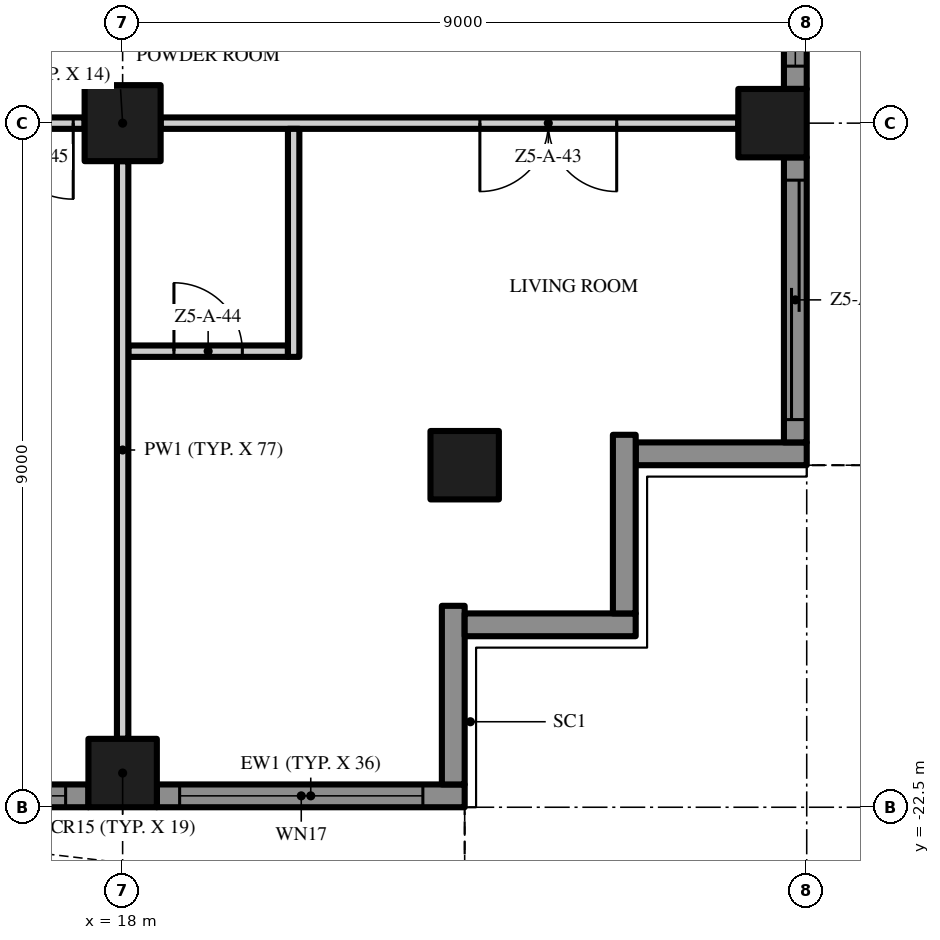
"""IFC4 building model, lengths in metres.
Left out: names, types, materials, properties, quantities, classifications, styles, units other than length and angle.
Written with IfcOpenShell. Run it as: python <this file> out.ifc"""

import sys

from ifc_helpers import new_model, si_unit, direction, frame, frame_2d, origin, origin_2d, place, context, subcontext, project, spatial, polyline, rectangle, outline, extrude, element, fill, save


model = new_model("IFC4")
c1 = context("Model", 3, precision=1e-05, world=origin(), true_north=direction((0.0, 1.0)))
c2 = subcontext(c1, "Body", "Model", "MODEL_VIEW")
j1 = project(units=[si_unit("LENGTHUNIT", "METRE"), si_unit("PLANEANGLEUNIT", "RADIAN")], contexts=[c1])
p1 = place(None, origin())
s1 = spatial("IfcSite", under=j1, at=p1, CompositionType="ELEMENT")
p2 = place(p1, origin())
s2 = spatial("IfcBuilding", under=s1, at=p2, CompositionType="ELEMENT")
p3 = place(p2, frame((0.0, 0.0, 246.4)))
s3 = spatial("IfcBuildingStorey", under=s2, at=p3, CompositionType="ELEMENT", Elevation=246.4)
p4 = place(p3, frame((18.0, -13.5, 0.0), z_axis=(0.0, 0.0, 1.0), x_axis=(1.0, 0.0, 0.0)))
e1 = element("IfcColumn", 1, at=p4, inside=s3, PredefinedType="COLUMN", context=c2, shape_type="SweptSolid", body=[
    extrude(rectangle(XDim=1.0, YDim=1.0, at=origin_2d()), origin(), (0.0, 0.0, 1.0), 3.5),
])
for number, where, z_axis, x_axis in (
    (2, (18.0, -22.05, 0.0), (0.0, 0.0, 1.0), (1.0, 0.0, 0.0)),
    (3, (26.55, -13.5, 0.0), (0.0, 0.0, 1.0), (1.0, 0.0, 0.0)),
    (4, (22.5, -18.0, 0.0), (0.0, 0.0, 1.0), (1.0, 0.0, 0.0)),
):
    element("IfcColumn", number, at=place(p3, frame(where, z_axis=z_axis, x_axis=x_axis)), inside=s3, PredefinedType="COLUMN", context=c2, shape_type="SweptSolid", body=[
        extrude(rectangle(XDim=0.9, YDim=0.9, at=origin_2d()), origin(), (0.0, 0.0, 1.0), 3.5),
    ])
p5 = place(p3, frame((17.55, -22.35, 0.0), z_axis=(0.0, 0.0, 1.0), x_axis=(-1.0, 0.0, 0.0)))
e5 = element("IfcWall", 5, at=p5, inside=s3, PredefinedType="SOLIDWALL", context=c2, shape_type="SweptSolid", body=[
    extrude(rectangle(XDim=8.1, YDim=0.3, at=frame_2d((4.05, 0.0))), origin(), (0.0, 0.0, 1.0), 3.5),
])
p6 = place(p5, frame((4.6, 0.0, 0.0)))
e6 = element("IfcOpeningElement", 6, at=p6, cuts=e5, PredefinedType="OPENING", context=c2, shape_type="SweptSolid", body=[
    extrude(rectangle(XDim=3.2, YDim=2.4, at=frame_2d((1.6, 1.2))), frame((0.0, 0.16, 0.0), z_axis=(0.0, -1.0, 0.0), x_axis=(1.0, 0.0, 0.0)), (0.0, 0.0, 1.0), 0.32),
])
p7 = place(p5, frame((0.3, 0.0, 0.45)))
e7 = element("IfcOpeningElement", 7, at=p7, cuts=e5, PredefinedType="OPENING", context=c2, shape_type="SweptSolid", body=[
    extrude(rectangle(XDim=3.2, YDim=2.65, at=frame_2d((1.6, 1.325))), frame((0.0, 0.16, 0.0), z_axis=(0.0, -1.0, 0.0), x_axis=(1.0, 0.0, 0.0)), (0.0, 0.0, 1.0), 0.32),
])
p8 = place(p3, frame((22.5, -22.35, 0.0), z_axis=(0.0, 0.0, 1.0), x_axis=(-1.0, 0.0, 0.0)))
e8 = element("IfcWall", 8, at=p8, inside=s3, PredefinedType="SOLIDWALL", context=c2, shape_type="SweptSolid", body=[
    extrude(rectangle(XDim=4.05, YDim=0.3, at=frame_2d((2.025, 0.0))), origin(), (0.0, 0.0, 1.0), 3.5),
])
p9 = place(p8, frame((0.55, 0.0, 0.45)))
e9 = element("IfcOpeningElement", 9, at=p9, cuts=e8, PredefinedType="OPENING", context=c2, shape_type="SweptSolid", body=[
    extrude(rectangle(XDim=3.2, YDim=2.65, at=frame_2d((1.6, 1.325))), frame((0.0, 0.16, 0.0), z_axis=(0.0, -1.0, 0.0), x_axis=(1.0, 0.0, 0.0)), (0.0, 0.0, 1.0), 0.32),
])
p10 = place(p3, frame((22.35, -19.85, 0.0), z_axis=(0.0, 0.0, 1.0), x_axis=(0.0, -1.0, 0.0)))
e10 = element("IfcWall", 10, at=p10, inside=s3, PredefinedType="SOLIDWALL", context=c2, shape_type="SweptSolid", body=[
    extrude(rectangle(XDim=2.35, YDim=0.3, at=frame_2d((1.175, 0.0))), origin(), (0.0, 0.0, 1.0), 3.5),
])
p11 = place(p3, frame((24.75, -20.1, 0.0), z_axis=(0.0, 0.0, 1.0), x_axis=(-1.0, 0.0, 0.0)))
e11 = element("IfcWall", 11, at=p11, inside=s3, PredefinedType="SOLIDWALL", context=c2, shape_type="SweptSolid", body=[
    extrude(rectangle(XDim=2.25, YDim=0.3, at=frame_2d((1.125, 0.0))), origin(), (0.0, 0.0, 1.0), 3.5),
])
p12 = place(p3, frame((24.6, -17.6, 0.0), z_axis=(0.0, 0.0, 1.0), x_axis=(0.0, -1.0, 0.0)))
e12 = element("IfcWall", 12, at=p12, inside=s3, PredefinedType="SOLIDWALL", context=c2, shape_type="SweptSolid", body=[
    extrude(rectangle(XDim=2.35, YDim=0.3, at=frame_2d((1.175, 0.0))), origin(), (0.0, 0.0, 1.0), 3.5),
])
p13 = place(p3, frame((27.0, -17.85, 0.0), z_axis=(0.0, 0.0, 1.0), x_axis=(-1.0, 0.0, 0.0)))
e13 = element("IfcWall", 13, at=p13, inside=s3, PredefinedType="SOLIDWALL", context=c2, shape_type="SweptSolid", body=[
    extrude(rectangle(XDim=2.25, YDim=0.3, at=frame_2d((1.125, 0.0))), origin(), (0.0, 0.0, 1.0), 3.5),
])
p14 = place(p3, frame((26.85, -13.95, 0.0), z_axis=(0.0, 0.0, 1.0), x_axis=(0.0, -1.0, 0.0)))
e14 = element("IfcWall", 14, at=p14, inside=s3, PredefinedType="SOLIDWALL", context=c2, shape_type="SweptSolid", body=[
    extrude(rectangle(XDim=3.75, YDim=0.3, at=frame_2d((1.875, 0.0))), origin(), (0.0, 0.0, 1.0), 3.5),
])
p15 = place(p14, frame((0.3, 0.0, 0.0)))
e15 = element("IfcOpeningElement", 15, at=p15, cuts=e14, PredefinedType="OPENING", context=c2, shape_type="SweptSolid", body=[
    extrude(rectangle(XDim=3.15, YDim=2.4, at=frame_2d((1.575, 1.2))), frame((0.0, 0.16, 0.0), z_axis=(0.0, -1.0, 0.0), x_axis=(1.0, 0.0, 0.0)), (0.0, 0.0, 1.0), 0.32),
])
p16 = place(p3, frame((26.85, -4.95, 0.0), z_axis=(0.0, 0.0, 1.0), x_axis=(0.0, -1.0, 0.0)))
e16 = element("IfcWall", 16, at=p16, inside=s3, PredefinedType="SOLIDWALL", context=c2, shape_type="SweptSolid", body=[
    extrude(rectangle(XDim=8.1, YDim=0.3, at=frame_2d((4.05, 0.0))), origin(), (0.0, 0.0, 1.0), 3.5),
])
p17 = place(p16, frame((4.6, 0.0, 0.45)))
e17 = element("IfcOpeningElement", 17, at=p17, cuts=e16, PredefinedType="OPENING", context=c2, shape_type="SweptSolid", body=[
    extrude(rectangle(XDim=3.2, YDim=2.65, at=frame_2d((1.6, 1.325))), frame((0.0, 0.16, 0.0), z_axis=(0.0, -1.0, 0.0), x_axis=(1.0, 0.0, 0.0)), (0.0, 0.0, 1.0), 0.32),
])
p18 = place(p16, frame((0.3, 0.0, 0.45)))
e18 = element("IfcOpeningElement", 18, at=p18, cuts=e16, PredefinedType="OPENING", context=c2, shape_type="SweptSolid", body=[
    extrude(rectangle(XDim=3.2, YDim=2.65, at=frame_2d((1.6, 1.325))), frame((0.0, 0.16, 0.0), z_axis=(0.0, -1.0, 0.0), x_axis=(1.0, 0.0, 0.0)), (0.0, 0.0, 1.0), 0.32),
])
p19 = place(p3, origin())
e19 = element("IfcWall", 19, at=p19, inside=s3, PredefinedType="USERDEFINED", context=c2, shape_type="SweptSolid", body=[
    extrude(outline(polyline([(-22.5, -25.149), (-21.0, -25.485), (-20.625, -25.5), (-19.5, -25.369), (-18.0, -24.845), (-16.5, -24.112), (-15.0, -23.451), (-13.5, -23.115), (-13.125, -23.1), (-12.0, -23.231), (-10.5, -23.755), (-9.0, -24.488), (-7.5, -25.149), (-6.0, -25.485), (-5.625, -25.5), (-4.5, -25.369), (-3.0, -24.845), (-1.5, -24.112), (0.0, -23.451), (1.5, -23.115), (1.875, -23.1), (3.0, -23.231), (4.5, -23.755), (6.0, -24.488), (7.5, -25.149), (9.0, -25.485), (9.375, -25.5), (10.5, -25.369), (12.0, -24.845), (13.5, -24.112), (15.0, -23.451), (16.5, -23.115), (16.875, -23.1), (18.0, -23.231), (19.5, -23.755), (21.0, -24.488), (22.5, -25.149), (22.601, -24.92), (21.105, -24.261), (19.596, -23.524), (18.056, -22.986), (16.885, -22.849), (16.467, -22.866), (14.921, -23.213), (13.395, -23.885), (11.904, -24.614), (10.444, -25.124), (9.365, -25.249), (9.033, -25.236), (7.579, -24.91), (6.105, -24.261), (4.596, -23.524), (3.056, -22.986), (1.885, -22.849), (1.467, -22.866), (-0.079, -23.213), (-1.605, -23.885), (-3.096, -24.614), (-4.556, -25.124), (-5.635, -25.249), (-5.967, -25.236), (-7.421, -24.91), (-8.895, -24.261), (-10.404, -23.524), (-11.944, -22.986), (-13.115, -22.849), (-13.533, -22.866), (-15.079, -23.213), (-16.605, -23.885), (-18.096, -24.614), (-19.556, -25.124), (-20.635, -25.249), (-20.967, -25.236), (-22.445, -24.905), (-22.5, -25.149)])), origin(), (0.0, 0.0, 1.0), 0.9),
])
p20 = place(p3, origin())
e20 = element("IfcWall", 20, at=p20, inside=s3, PredefinedType="USERDEFINED", context=c2, shape_type="SweptSolid", body=[
    extrude(outline(polyline([(29.649, -18.0), (29.985, -16.5), (30.0, -16.125), (29.869, -15.0), (29.345, -13.5), (28.612, -12.0), (27.951, -10.5), (27.615, -9.0), (27.6, -8.625), (27.731, -7.5), (28.255, -6.0), (28.988, -4.5), (29.649, -3.0), (29.985, -1.5), (30.0, -1.125), (29.869, 0.0), (29.345, 1.5), (28.612, 3.0), (27.951, 4.5), (27.615, 6.0), (27.6, 6.375), (27.731, 7.5), (28.255, 9.0), (28.988, 10.5), (29.649, 12.0), (29.985, 13.5), (30.0, 13.875), (29.869, 15.0), (29.345, 16.5), (28.612, 18.0), (28.388, 17.89), (29.114, 16.404), (29.624, 14.944), (29.749, 13.865), (29.736, 13.533), (29.41, 12.079), (28.761, 10.605), (28.024, 9.096), (27.486, 7.556), (27.349, 6.385), (27.366, 5.967), (27.713, 4.421), (28.385, 2.895), (29.114, 1.404), (29.624, -0.056), (29.749, -1.135), (29.736, -1.467), (29.41, -2.921), (28.761, -4.395), (28.024, -5.904), (27.486, -7.444), (27.349, -8.615), (27.366, -9.033), (27.713, -10.579), (28.385, -12.105), (29.114, -13.596), (29.624, -15.056), (29.749, -16.135), (29.736, -16.467), (29.405, -17.945), (29.649, -18.0)])), origin(), (0.0, 0.0, 1.0), 0.9),
])
p21 = place(p3, frame((18.075, -16.5, 0.0), z_axis=(0.0, 0.0, 1.0), x_axis=(1.0, 0.0, 0.0)))
e21 = element("IfcWall", 21, at=p21, inside=s3, PredefinedType="PARTITIONING", context=c2, shape_type="SweptSolid", body=[
    extrude(rectangle(XDim=2.1, YDim=0.15, at=frame_2d((1.05, 0.0))), origin(), (0.0, 0.0, 1.0), 3.5),
])
p22 = place(p21, frame((0.6, 0.0, 0.0)))
e22 = element("IfcOpeningElement", 22, at=p22, cuts=e21, PredefinedType="OPENING", context=c2, shape_type="SweptSolid", body=[
    extrude(rectangle(XDim=0.9, YDim=2.1, at=frame_2d((0.45, 1.05))), frame((0.0, 0.085, 0.0), z_axis=(0.0, -1.0, 0.0), x_axis=(1.0, 0.0, 0.0)), (0.0, 0.0, 1.0), 0.17),
])
p23 = place(p3, frame((17.5, -13.5, 0.0), z_axis=(0.0, 0.0, 1.0), x_axis=(-1.0, 0.0, 0.0)))
e23 = element("IfcWall", 23, at=p23, inside=s3, PredefinedType="PARTITIONING", context=c2, shape_type="SweptSolid", body=[
    extrude(rectangle(XDim=8.0, YDim=0.15, at=frame_2d((4.0, 0.0))), origin(), (0.0, 0.0, 1.0), 3.5),
])
p24 = place(p23, frame((0.15, 0.0, 0.0)))
e24 = element("IfcOpeningElement", 24, at=p24, cuts=e23, PredefinedType="OPENING", context=c2, shape_type="SweptSolid", body=[
    extrude(rectangle(XDim=1.0, YDim=2.4, at=frame_2d((0.5, 1.2))), frame((0.0, 0.085, 0.0), z_axis=(0.0, -1.0, 0.0), x_axis=(1.0, 0.0, 0.0)), (0.0, 0.0, 1.0), 0.17),
])
p25 = place(p23, frame((6.85, 0.0, 0.0)))
e25 = element("IfcOpeningElement", 25, at=p25, cuts=e23, PredefinedType="OPENING", context=c2, shape_type="SweptSolid", body=[
    extrude(rectangle(XDim=1.0, YDim=2.4, at=frame_2d((0.5, 1.2))), frame((0.0, 0.085, 0.0), z_axis=(0.0, -1.0, 0.0), x_axis=(1.0, 0.0, 0.0)), (0.0, 0.0, 1.0), 0.17),
])
p26 = place(p3, frame((26.1, -13.5, 0.0), z_axis=(0.0, 0.0, 1.0), x_axis=(-1.0, 0.0, 0.0)))
e26 = element("IfcWall", 26, at=p26, inside=s3, PredefinedType="PARTITIONING", context=c2, shape_type="SweptSolid", body=[
    extrude(rectangle(XDim=7.6, YDim=0.15, at=frame_2d((3.8, 0.0))), origin(), (0.0, 0.0, 1.0), 3.5),
])
p27 = place(p26, frame((1.6, 0.0, 0.0)))
e27 = element("IfcOpeningElement", 27, at=p27, cuts=e26, PredefinedType="OPENING", context=c2, shape_type="SweptSolid", body=[
    extrude(rectangle(XDim=1.8, YDim=2.4, at=frame_2d((0.9, 1.2))), frame((0.0, 0.085, 0.0), z_axis=(0.0, -1.0, 0.0), x_axis=(1.0, 0.0, 0.0)), (0.0, 0.0, 1.0), 0.17),
])
p28 = place(p3, frame((18.0, -21.6, 0.0), z_axis=(0.0, 0.0, 1.0), x_axis=(0.0, 1.0, 0.0)))
e28 = element("IfcWall", 28, at=p28, inside=s3, PredefinedType="PARTITIONING", context=c2, shape_type="SweptSolid", body=[
    extrude(rectangle(XDim=7.6, YDim=0.15, at=frame_2d((3.8, 0.0))), origin(), (0.0, 0.0, 1.0), 3.5),
])
p29 = place(p3, frame((20.25, -16.575, 0.0), z_axis=(0.0, 0.0, 1.0), x_axis=(0.0, 1.0, 0.0)))
e29 = element("IfcWall", 29, at=p29, inside=s3, PredefinedType="PARTITIONING", context=c2, shape_type="SweptSolid", body=[
    extrude(rectangle(XDim=3.0, YDim=0.15, at=frame_2d((1.5, 0.0))), origin(), (0.0, 0.0, 1.0), 3.5),
])
p30 = place(p7, origin())
e30 = element("IfcWindow", 30, at=p30, inside=s3, PartitioningType="SINGLE_PANEL", PredefinedType="WINDOW", context=c2, shape_type="SweptSolid", body=[
    extrude(rectangle(XDim=3.2, YDim=2.65, at=frame_2d((1.6, 1.325))), frame((0.0, 0.03, 0.0), z_axis=(0.0, -1.0, 0.0), x_axis=(1.0, 0.0, 0.0)), (0.0, 0.0, 1.0), 0.06),
])
fill(e7, e30)
p31 = place(p9, origin())
e31 = element("IfcWindow", 31, at=p31, inside=s3, PartitioningType="SINGLE_PANEL", PredefinedType="WINDOW", context=c2, shape_type="SweptSolid", body=[
    extrude(rectangle(XDim=3.2, YDim=2.65, at=frame_2d((1.6, 1.325))), frame((0.0, 0.03, 0.0), z_axis=(0.0, -1.0, 0.0), x_axis=(1.0, 0.0, 0.0)), (0.0, 0.0, 1.0), 0.06),
])
fill(e9, e31)
p32 = place(p15, origin())
e32 = element("IfcDoor", 32, at=p32, inside=s3, OperationType="SINGLE_SWING_LEFT", PredefinedType="DOOR", context=c2, shape_type="SweptSolid", body=[
    extrude(rectangle(XDim=3.15, YDim=2.4, at=frame_2d((1.575, 1.2))), frame((0.0, 0.025, 0.0), z_axis=(0.0, -1.0, 0.0), x_axis=(1.0, 0.0, 0.0)), (0.0, 0.0, 1.0), 0.05),
])
fill(e15, e32)
p33 = place(p17, origin())
e33 = element("IfcWindow", 33, at=p33, inside=s3, PartitioningType="SINGLE_PANEL", PredefinedType="WINDOW", context=c2, shape_type="SweptSolid", body=[
    extrude(rectangle(XDim=3.2, YDim=2.65, at=frame_2d((1.6, 1.325))), frame((0.0, 0.03, 0.0), z_axis=(0.0, -1.0, 0.0), x_axis=(1.0, 0.0, 0.0)), (0.0, 0.0, 1.0), 0.06),
])
fill(e17, e33)
p34 = place(p27, origin())
e34 = element("IfcDoor", 34, at=p34, inside=s3, OperationType="DOUBLE_DOOR_SINGLE_SWING", PredefinedType="DOOR", context=c2, shape_type="SweptSolid", body=[
    extrude(rectangle(XDim=1.8, YDim=2.4, at=frame_2d((0.9, 1.2))), frame((0.0, 0.025, 0.0), z_axis=(0.0, -1.0, 0.0), x_axis=(1.0, 0.0, 0.0)), (0.0, 0.0, 1.0), 0.05),
])
fill(e27, e34)
p35 = place(p22, origin())
e35 = element("IfcDoor", 35, at=p35, inside=s3, OperationType="SINGLE_SWING_LEFT", PredefinedType="DOOR", context=c2, shape_type="SweptSolid", body=[
    extrude(rectangle(XDim=0.9, YDim=2.1, at=frame_2d((0.45, 1.05))), frame((0.0, 0.025, 0.0), z_axis=(0.0, -1.0, 0.0), x_axis=(1.0, 0.0, 0.0)), (0.0, 0.0, 1.0), 0.05),
])
fill(e22, e35)
p36 = place(p24, origin())
e36 = element("IfcDoor", 36, at=p36, inside=s3, OperationType="SINGLE_SWING_LEFT", PredefinedType="DOOR", context=c2, shape_type="SweptSolid", body=[
    extrude(rectangle(XDim=1.0, YDim=2.4, at=frame_2d((0.5, 1.2))), frame((0.0, 0.025, 0.0), z_axis=(0.0, -1.0, 0.0), x_axis=(1.0, 0.0, 0.0)), (0.0, 0.0, 1.0), 0.05),
])
fill(e24, e36)
save(model, sys.argv[1])
